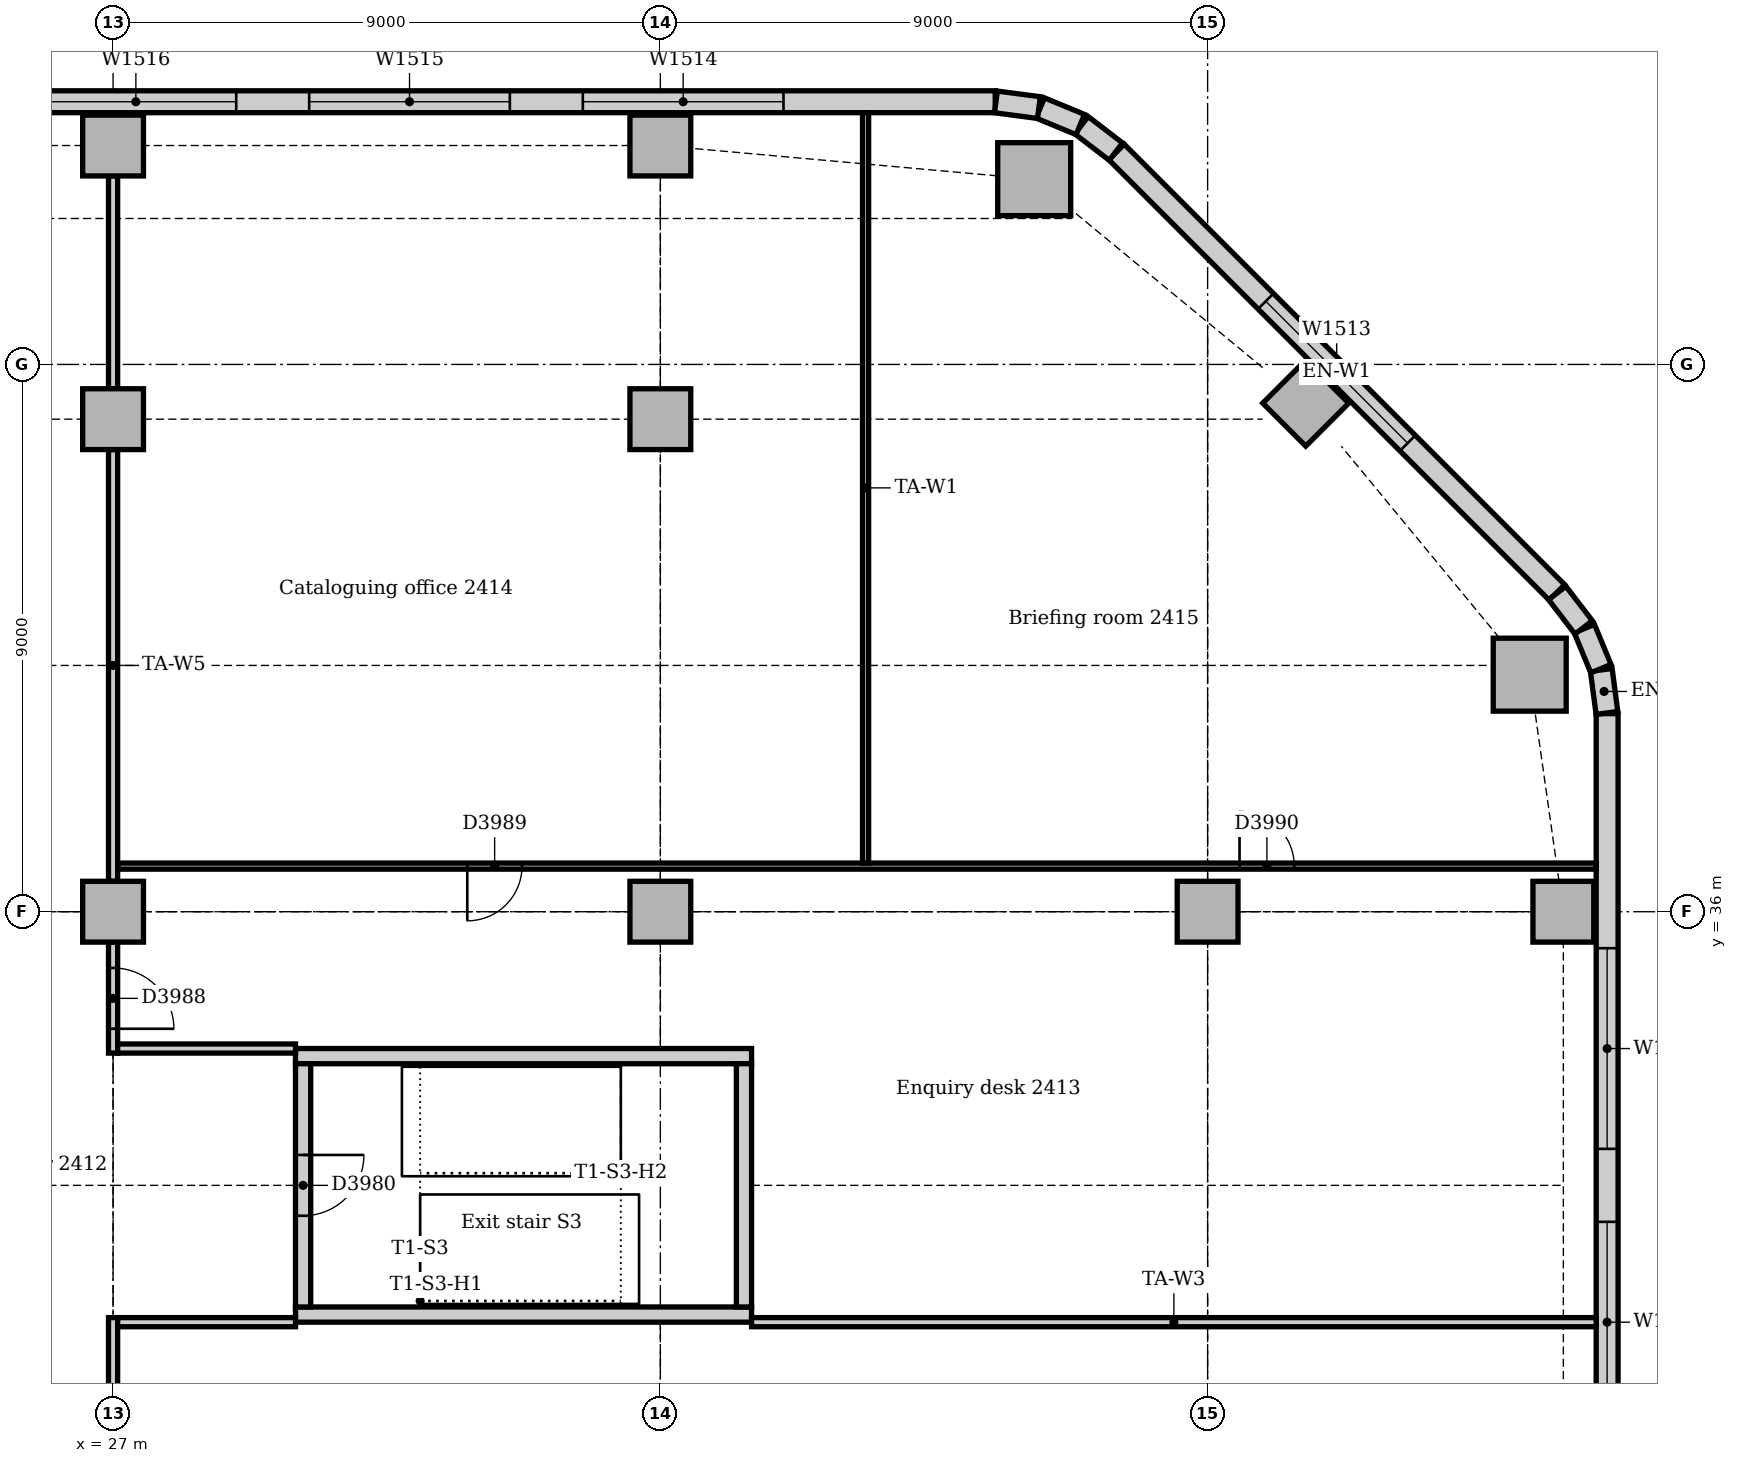
"""IFC4 building model, lengths in metres.
Left out: names, types, materials, properties, quantities, classifications, styles, units other than length and angle.
Written with IfcOpenShell. Run it as: python <this file> out.ifc"""

import sys

from ifc_helpers import new_model, si_unit, direction, frame, frame_2d, origin, origin_2d, place, context, subcontext, project, spatial, rectangle, extrude, element, fill, save


model = new_model("IFC4")
c1 = context("Model", 3, precision=1e-05, world=origin(), true_north=direction((0.0, 1.0)))
c2 = subcontext(c1, "Body", "Model", "MODEL_VIEW")
j1 = project(units=[si_unit("LENGTHUNIT", "METRE"), si_unit("PLANEANGLEUNIT", "RADIAN")], contexts=[c1])
p1 = place(None, origin())
s1 = spatial("IfcSite", under=j1, at=p1, CompositionType="ELEMENT")
p2 = place(p1, origin())
s2 = spatial("IfcBuilding", under=s1, at=p2, CompositionType="ELEMENT")
p3 = place(p2, frame((0.0, 0.0, 104.0)))
s3 = spatial("IfcBuildingStorey", under=s2, at=p3, CompositionType="ELEMENT", Elevation=104.0)
for number, where, z_axis, x_axis in (
    (1, (30.0, 29.375, 0.0), (0.0, 0.0, 1.0), (1.0, 0.0, 0.0)),
    (2, (37.5, 33.625, 0.0), (0.0, 0.0, 1.0), (-1.0, 0.0, 0.0)),
):
    element("IfcWall", number, at=place(p3, frame(where, z_axis=z_axis, x_axis=x_axis)), inside=s3, PredefinedType="SOLIDWALL", context=c2, shape_type="SweptSolid", body=[
        extrude(rectangle(XDim=7.5, YDim=0.25, at=frame_2d((3.75, 0.0))), origin(), (0.0, 0.0, 1.0), 4.0),
    ])
p4 = place(p3, frame((37.375, 29.5, 0.0), z_axis=(0.0, 0.0, 1.0), x_axis=(0.0, 1.0, 0.0)))
e3 = element("IfcWall", 3, at=p4, inside=s3, PredefinedType="SOLIDWALL", context=c2, shape_type="SweptSolid", body=[
    extrude(rectangle(XDim=4.0, YDim=0.25, at=frame_2d((2.0, 0.0))), origin(), (0.0, 0.0, 1.0), 4.0),
])
p5 = place(p3, frame((30.125, 33.5, 0.0), z_axis=(0.0, 0.0, 1.0), x_axis=(0.0, -1.0, 0.0)))
e4 = element("IfcWall", 4, at=p5, inside=s3, PredefinedType="SOLIDWALL", context=c2, shape_type="SweptSolid", body=[
    extrude(rectangle(XDim=4.0, YDim=0.25, at=frame_2d((2.0, 0.0))), origin(), (0.0, 0.0, 1.0), 4.0),
])
p6 = place(p5, frame((1.5, 0.0, 0.0)))
e5 = element("IfcOpeningElement", 5, at=p6, cuts=e4, PredefinedType="OPENING", context=c2, shape_type="SweptSolid", body=[
    extrude(rectangle(XDim=1.0, YDim=2.1, at=frame_2d((0.5, 1.05))), frame((0.0, 0.135, 0.0), z_axis=(0.0, -1.0, 0.0), x_axis=(1.0, 0.0, 0.0)), (0.0, 0.0, 1.0), 0.27),
])
for number, where, z_axis, x_axis in (
    (6, (50.297, 39.898, 0.0), (0.0, 0.0, 1.0), (1.0, 0.0, 0.0)),
    (7, (42.148, 48.047, 0.0), (0.0, 0.0, 1.0), (1.0, 0.0, 0.0)),
):
    element("IfcColumn", number, at=place(p3, frame(where, z_axis=z_axis, x_axis=x_axis)), inside=s3, PredefinedType="COLUMN", context=c2, shape_type="SweptSolid", body=[
        extrude(rectangle(XDim=1.2, YDim=1.2, at=origin_2d()), origin(), (0.0, 0.0, 1.0), 3.85),
    ])
for number, where, z_axis, x_axis in (
    (8, (50.85, 36.0, 0.0), (0.0, 0.0, 1.0), (1.0, 0.0, 0.0)),
    (9, (46.614, 44.364, 0.0), (0.0, 0.0, 1.0), (0.707, 0.707, 0.0)),
    (10, (27.0, 48.6, 0.0), (0.0, 0.0, 1.0), (1.0, 0.0, 0.0)),
    (11, (36.0, 48.6, 0.0), (0.0, 0.0, 1.0), (1.0, 0.0, 0.0)),
    (12, (27.0, 36.0, 0.0), (0.0, 0.0, 1.0), (1.0, 0.0, 0.0)),
    (13, (27.0, 44.1, 0.0), (0.0, 0.0, 1.0), (1.0, 0.0, 0.0)),
    (14, (36.0, 36.0, 0.0), (0.0, 0.0, 1.0), (1.0, 0.0, 0.0)),
    (15, (36.0, 44.1, 0.0), (0.0, 0.0, 1.0), (1.0, 0.0, 0.0)),
    (16, (45.0, 36.0, 0.0), (0.0, 0.0, 1.0), (1.0, 0.0, 0.0)),
):
    element("IfcColumn", number, at=place(p3, frame(where, z_axis=z_axis, x_axis=x_axis)), inside=s3, PredefinedType="COLUMN", context=c2, shape_type="SweptSolid", body=[
        extrude(rectangle(XDim=1.0, YDim=1.0, at=origin_2d()), origin(), (0.0, 0.0, 1.0), 3.85),
    ])
p7 = place(p3, frame((51.57, 14.743, 0.0), z_axis=(0.0, 0.0, 1.0), x_axis=(0.0, 1.0, 0.0)))
e17 = element("IfcWall", 17, at=p7, inside=s3, PredefinedType="STANDARD", context=c2, shape_type="SweptSolid", body=[
    extrude(rectangle(XDim=24.515, YDim=0.36, at=frame_2d((12.257, 0.0))), origin(), (0.0, 0.0, 1.0), 3.85),
])
p8 = place(p7, frame((4.257, 0.0, 0.9)))
e18 = element("IfcOpeningElement", 18, at=p8, cuts=e17, PredefinedType="OPENING", context=c2, shape_type="SweptSolid", body=[
    extrude(rectangle(XDim=1.8, YDim=1.6, at=frame_2d((0.9, 0.8))), frame((0.0, 0.19, 0.0), z_axis=(0.0, -1.0, 0.0), x_axis=(1.0, 0.0, 0.0)), (0.0, 0.0, 1.0), 0.38),
])
p9 = place(p7, frame((8.357, 0.0, 0.9)))
e19 = element("IfcOpeningElement", 19, at=p9, cuts=e17, PredefinedType="OPENING", context=c2, shape_type="SweptSolid", body=[
    extrude(rectangle(XDim=3.3, YDim=1.6, at=frame_2d((1.65, 0.8))), frame((0.0, 0.19, 0.0), z_axis=(0.0, -1.0, 0.0), x_axis=(1.0, 0.0, 0.0)), (0.0, 0.0, 1.0), 0.38),
])
p10 = place(p7, frame((12.857, 0.0, 0.9)))
e20 = element("IfcOpeningElement", 20, at=p10, cuts=e17, PredefinedType="OPENING", context=c2, shape_type="SweptSolid", body=[
    extrude(rectangle(XDim=3.3, YDim=1.6, at=frame_2d((1.65, 0.8))), frame((0.0, 0.19, 0.0), z_axis=(0.0, -1.0, 0.0), x_axis=(1.0, 0.0, 0.0)), (0.0, 0.0, 1.0), 0.38),
])
p11 = place(p7, frame((17.357, 0.0, 0.9)))
e21 = element("IfcOpeningElement", 21, at=p11, cuts=e17, PredefinedType="OPENING", context=c2, shape_type="SweptSolid", body=[
    extrude(rectangle(XDim=3.3, YDim=1.6, at=frame_2d((1.65, 0.8))), frame((0.0, 0.19, 0.0), z_axis=(0.0, -1.0, 0.0), x_axis=(1.0, 0.0, 0.0)), (0.0, 0.0, 1.0), 0.38),
])
p12 = place(p3, frame((50.744, 41.251, 0.0), z_axis=(0.0, 0.0, 1.0), x_axis=(-0.707106781187, 0.707106781187, 0.0)))
e22 = element("IfcWall", 22, at=p12, inside=s3, PredefinedType="STANDARD", context=c2, shape_type="SweptSolid", body=[
    extrude(rectangle(XDim=10.243, YDim=0.36, at=frame_2d((5.121, 0.0))), origin(), (0.0, 0.0, 1.0), 3.85),
])
p13 = place(p12, frame((3.471, 0.0, 0.9)))
e23 = element("IfcOpeningElement", 23, at=p13, cuts=e22, PredefinedType="OPENING", context=c2, shape_type="SweptSolid", body=[
    extrude(rectangle(XDim=3.3, YDim=1.6, at=frame_2d((1.65, 0.8))), frame((0.0, 0.19, 0.0), z_axis=(0.0, -1.0, 0.0), x_axis=(1.0, 0.0, 0.0)), (0.0, 0.0, 1.0), 0.38),
])
p14 = place(p3, frame((41.507, 49.32, 0.0), z_axis=(0.0, 0.0, 1.0), x_axis=(-1.0, 0.0, 0.0)))
e24 = element("IfcWall", 24, at=p14, inside=s3, PredefinedType="STANDARD", context=c2, shape_type="SweptSolid", body=[
    extrude(rectangle(XDim=37.265, YDim=0.36, at=frame_2d((18.632, 0.0))), origin(), (0.0, 0.0, 1.0), 3.85),
])
p15 = place(p14, frame((3.482, 0.0, 0.9)))
e25 = element("IfcOpeningElement", 25, at=p15, cuts=e24, PredefinedType="OPENING", context=c2, shape_type="SweptSolid", body=[
    extrude(rectangle(XDim=3.3, YDim=1.6, at=frame_2d((1.65, 0.8))), frame((0.0, 0.19, 0.0), z_axis=(0.0, -1.0, 0.0), x_axis=(1.0, 0.0, 0.0)), (0.0, 0.0, 1.0), 0.38),
])
p16 = place(p14, frame((7.982, 0.0, 0.9)))
e26 = element("IfcOpeningElement", 26, at=p16, cuts=e24, PredefinedType="OPENING", context=c2, shape_type="SweptSolid", body=[
    extrude(rectangle(XDim=3.3, YDim=1.6, at=frame_2d((1.65, 0.8))), frame((0.0, 0.19, 0.0), z_axis=(0.0, -1.0, 0.0), x_axis=(1.0, 0.0, 0.0)), (0.0, 0.0, 1.0), 0.38),
])
p17 = place(p14, frame((12.482, 0.0, 0.9)))
e27 = element("IfcOpeningElement", 27, at=p17, cuts=e24, PredefinedType="OPENING", context=c2, shape_type="SweptSolid", body=[
    extrude(rectangle(XDim=3.3, YDim=1.6, at=frame_2d((1.65, 0.8))), frame((0.0, 0.19, 0.0), z_axis=(0.0, -1.0, 0.0), x_axis=(1.0, 0.0, 0.0)), (0.0, 0.0, 1.0), 0.38),
])
p18 = place(p14, frame((17.032, 0.0, 0.9)))
e28 = element("IfcOpeningElement", 28, at=p18, cuts=e24, PredefinedType="OPENING", context=c2, shape_type="SweptSolid", body=[
    extrude(rectangle(XDim=1.8, YDim=1.6, at=frame_2d((0.9, 0.8))), frame((0.0, 0.19, 0.0), z_axis=(0.0, -1.0, 0.0), x_axis=(1.0, 0.0, 0.0)), (0.0, 0.0, 1.0), 0.38),
])
p19 = place(p14, frame((21.482, 0.0, 0.9)))
e29 = element("IfcOpeningElement", 29, at=p19, cuts=e24, PredefinedType="OPENING", context=c2, shape_type="SweptSolid", body=[
    extrude(rectangle(XDim=3.3, YDim=1.6, at=frame_2d((1.65, 0.8))), frame((0.0, 0.19, 0.0), z_axis=(0.0, -1.0, 0.0), x_axis=(1.0, 0.0, 0.0)), (0.0, 0.0, 1.0), 0.38),
])
p20 = place(p14, frame((25.982, 0.0, 0.9)))
e30 = element("IfcOpeningElement", 30, at=p20, cuts=e24, PredefinedType="OPENING", context=c2, shape_type="SweptSolid", body=[
    extrude(rectangle(XDim=3.3, YDim=1.6, at=frame_2d((1.65, 0.8))), frame((0.0, 0.19, 0.0), z_axis=(0.0, -1.0, 0.0), x_axis=(1.0, 0.0, 0.0)), (0.0, 0.0, 1.0), 0.38),
])
p21 = place(p14, frame((30.482, 0.0, 0.9)))
e31 = element("IfcOpeningElement", 31, at=p21, cuts=e24, PredefinedType="OPENING", context=c2, shape_type="SweptSolid", body=[
    extrude(rectangle(XDim=3.3, YDim=1.6, at=frame_2d((1.65, 0.8))), frame((0.0, 0.19, 0.0), z_axis=(0.0, -1.0, 0.0), x_axis=(1.0, 0.0, 0.0)), (0.0, 0.0, 1.0), 0.38),
])
for number, where, z_axis, x_axis in (
    (32, (51.567, 39.269, 0.0), (0.0, 0.0, 1.0), (-0.131, 0.991, 0.0)),
    (33, (51.468, 39.997, 0.0), (0.0, 0.0, 1.0), (-0.383, 0.924, 0.0)),
):
    element("IfcWall", number, at=place(p3, frame(where, z_axis=z_axis, x_axis=x_axis)), inside=s3, PredefinedType="STANDARD", context=c2, shape_type="SweptSolid", body=[
        extrude(rectangle(XDim=0.713, YDim=0.36, at=frame_2d((0.356, 0.0))), origin(), (0.0, 0.0, 1.0), 3.85),
    ])
for number, where, z_axis, x_axis in (
    (34, (51.184, 40.675, 0.0), (0.0, 0.0, 1.0), (-0.609, 0.793, 0.0)),
    (35, (43.491, 48.5, 0.0), (0.0, 0.0, 1.0), (-0.793, 0.609, 0.0)),
):
    element("IfcWall", number, at=place(p3, frame(where, z_axis=z_axis, x_axis=x_axis)), inside=s3, PredefinedType="STANDARD", context=c2, shape_type="SweptSolid", body=[
        extrude(rectangle(XDim=0.713, YDim=0.36, at=frame_2d((0.357, 0.0))), origin(), (0.0, 0.0, 1.0), 3.85),
    ])
for number, where, z_axis, x_axis in (
    (36, (42.906, 48.945, 0.0), (0.0, 0.0, 1.0), (-0.924, 0.383, 0.0)),
    (37, (42.226, 49.224, 0.0), (0.0, 0.0, 1.0), (-0.991, 0.131, 0.0)),
):
    element("IfcWall", number, at=place(p3, frame(where, z_axis=z_axis, x_axis=x_axis)), inside=s3, PredefinedType="STANDARD", context=c2, shape_type="SweptSolid", body=[
        extrude(rectangle(XDim=0.713, YDim=0.36, at=frame_2d((0.356, 0.0))), origin(), (0.0, 0.0, 1.0), 3.85),
    ])
p22 = place(p3, frame((27.0, 33.675, 0.0), z_axis=(0.0, 0.0, 1.0), x_axis=(0.0, 1.0, 0.0)))
e38 = element("IfcWall", 38, at=p22, inside=s3, PredefinedType="PARTITIONING", context=c2, shape_type="SweptSolid", body=[
    extrude(rectangle(XDim=1.825, YDim=0.15, at=frame_2d((0.912, 0.0))), origin(), (0.0, 0.0, 1.0), 3.256),
])
p23 = place(p22, frame((0.4, 0.0, 0.0)))
e39 = element("IfcOpeningElement", 39, at=p23, cuts=e38, PredefinedType="OPENING", context=c2, shape_type="SweptSolid", body=[
    extrude(rectangle(XDim=1.0, YDim=2.1, at=frame_2d((0.5, 1.05))), frame((0.0, 0.085, 0.0), z_axis=(0.0, -1.0, 0.0), x_axis=(1.0, 0.0, 0.0)), (0.0, 0.0, 1.0), 0.17),
])
p24 = place(p3, frame((27.0, 36.5, 0.0), z_axis=(0.0, 0.0, 1.0), x_axis=(0.0, 1.0, 0.0)))
e40 = element("IfcWall", 40, at=p24, inside=s3, PredefinedType="PARTITIONING", context=c2, shape_type="SweptSolid", body=[
    extrude(rectangle(XDim=7.1, YDim=0.15, at=frame_2d((3.55, 0.0))), origin(), (0.0, 0.0, 1.0), 3.256),
])
p25 = place(p3, frame((27.0, 44.6, 0.0), z_axis=(0.0, 0.0, 1.0), x_axis=(0.0, 1.0, 0.0)))
e41 = element("IfcWall", 41, at=p25, inside=s3, PredefinedType="PARTITIONING", context=c2, shape_type="SweptSolid", body=[
    extrude(rectangle(XDim=3.5, YDim=0.15, at=frame_2d((1.75, 0.0))), origin(), (0.0, 0.0, 1.0), 3.652),
])
p26 = place(p3, frame((27.0, 27.5, 0.0), z_axis=(0.0, 0.0, 1.0), x_axis=(0.0, 1.0, 0.0)))
e42 = element("IfcWall", 42, at=p26, inside=s3, PredefinedType="PARTITIONING", context=c2, shape_type="SweptSolid", body=[
    extrude(rectangle(XDim=1.825, YDim=0.15, at=frame_2d((0.912, 0.0))), origin(), (0.0, 0.0, 1.0), 3.256),
])
for number, where, z_axis, x_axis in (
    (43, (27.075, 29.25, 0.0), (0.0, 0.0, 1.0), (1.0, 0.0, 0.0)),
    (44, (27.075, 33.75, 0.0), (0.0, 0.0, 1.0), (1.0, 0.0, 0.0)),
):
    element("IfcWall", number, at=place(p3, frame(where, z_axis=z_axis, x_axis=x_axis)), inside=s3, PredefinedType="PARTITIONING", context=c2, shape_type="SweptSolid", body=[
        extrude(rectangle(XDim=2.925, YDim=0.15, at=frame_2d((1.462, 0.0))), origin(), (0.0, 0.0, 1.0), 3.85),
    ])
p27 = place(p3, frame((37.5, 29.25, 0.0), z_axis=(0.0, 0.0, 1.0), x_axis=(1.0, 0.0, 0.0)))
e45 = element("IfcWall", 45, at=p27, inside=s3, PredefinedType="PARTITIONING", context=c2, shape_type="SweptSolid", body=[
    extrude(rectangle(XDim=13.89, YDim=0.15, at=frame_2d((6.945, 0.0))), origin(), (0.0, 0.0, 1.0), 3.85),
])
p28 = place(p3, frame((27.075, 36.75, 0.0), z_axis=(0.0, 0.0, 1.0), x_axis=(1.0, 0.0, 0.0)))
e46 = element("IfcWall", 46, at=p28, inside=s3, PredefinedType="PARTITIONING", context=c2, shape_type="SweptSolid", body=[
    extrude(rectangle(XDim=24.315, YDim=0.1, at=frame_2d((12.158, 0.0))), origin(), (0.0, 0.0, 1.0), 3.85),
])
p29 = place(p28, frame((5.75, 0.0, 0.0)))
e47 = element("IfcOpeningElement", 47, at=p29, cuts=e46, PredefinedType="OPENING", context=c2, shape_type="SweptSolid", body=[
    extrude(rectangle(XDim=0.9, YDim=2.1, at=frame_2d((0.45, 1.05))), frame((0.0, 0.06, 0.0), z_axis=(0.0, -1.0, 0.0), x_axis=(1.0, 0.0, 0.0)), (0.0, 0.0, 1.0), 0.12),
])
p30 = place(p28, frame((18.45, 0.0, 0.0)))
e48 = element("IfcOpeningElement", 48, at=p30, cuts=e46, PredefinedType="OPENING", context=c2, shape_type="SweptSolid", body=[
    extrude(rectangle(XDim=0.9, YDim=2.1, at=frame_2d((0.45, 1.05))), frame((0.0, 0.06, 0.0), z_axis=(0.0, -1.0, 0.0), x_axis=(1.0, 0.0, 0.0)), (0.0, 0.0, 1.0), 0.12),
])
p31 = place(p3, frame((39.375, 36.8, 0.0), z_axis=(0.0, 0.0, 1.0), x_axis=(0.0, 1.0, 0.0)))
e49 = element("IfcWall", 49, at=p31, inside=s3, PredefinedType="PARTITIONING", context=c2, shape_type="SweptSolid", body=[
    extrude(rectangle(XDim=12.34, YDim=0.1, at=frame_2d((6.17, 0.0))), origin(), (0.0, 0.0, 1.0), 3.85),
])
p32 = place(p10, origin())
e50 = element("IfcWindow", 50, at=p32, inside=s3, PartitioningType="SINGLE_PANEL", PredefinedType="WINDOW", context=c2, shape_type="SweptSolid", body=[
    extrude(rectangle(XDim=3.3, YDim=1.6, at=frame_2d((1.65, 0.8))), frame((0.0, 0.13, 0.0), z_axis=(0.0, -1.0, 0.0), x_axis=(1.0, 0.0, 0.0)), (0.0, 0.0, 1.0), 0.06),
])
fill(e20, e50)
p33 = place(p11, origin())
e51 = element("IfcWindow", 51, at=p33, inside=s3, PartitioningType="SINGLE_PANEL", PredefinedType="WINDOW", context=c2, shape_type="SweptSolid", body=[
    extrude(rectangle(XDim=3.3, YDim=1.6, at=frame_2d((1.65, 0.8))), frame((0.0, 0.13, 0.0), z_axis=(0.0, -1.0, 0.0), x_axis=(1.0, 0.0, 0.0)), (0.0, 0.0, 1.0), 0.06),
])
fill(e21, e51)
p34 = place(p13, origin())
e52 = element("IfcWindow", 52, at=p34, inside=s3, PartitioningType="SINGLE_PANEL", PredefinedType="WINDOW", context=c2, shape_type="SweptSolid", body=[
    extrude(rectangle(XDim=3.3, YDim=1.6, at=frame_2d((1.65, 0.8))), frame((0.0, 0.13, 0.0), z_axis=(0.0, -1.0, 0.0), x_axis=(1.0, 0.0, 0.0)), (0.0, 0.0, 1.0), 0.06),
])
fill(e23, e52)
p35 = place(p15, origin())
e53 = element("IfcWindow", 53, at=p35, inside=s3, PartitioningType="SINGLE_PANEL", PredefinedType="WINDOW", context=c2, shape_type="SweptSolid", body=[
    extrude(rectangle(XDim=3.3, YDim=1.6, at=frame_2d((1.65, 0.8))), frame((0.0, 0.13, 0.0), z_axis=(0.0, -1.0, 0.0), x_axis=(1.0, 0.0, 0.0)), (0.0, 0.0, 1.0), 0.06),
])
fill(e25, e53)
p36 = place(p16, origin())
e54 = element("IfcWindow", 54, at=p36, inside=s3, PartitioningType="SINGLE_PANEL", PredefinedType="WINDOW", context=c2, shape_type="SweptSolid", body=[
    extrude(rectangle(XDim=3.3, YDim=1.6, at=frame_2d((1.65, 0.8))), frame((0.0, 0.13, 0.0), z_axis=(0.0, -1.0, 0.0), x_axis=(1.0, 0.0, 0.0)), (0.0, 0.0, 1.0), 0.06),
])
fill(e26, e54)
p37 = place(p17, origin())
e55 = element("IfcWindow", 55, at=p37, inside=s3, PartitioningType="SINGLE_PANEL", PredefinedType="WINDOW", context=c2, shape_type="SweptSolid", body=[
    extrude(rectangle(XDim=3.3, YDim=1.6, at=frame_2d((1.65, 0.8))), frame((0.0, 0.13, 0.0), z_axis=(0.0, -1.0, 0.0), x_axis=(1.0, 0.0, 0.0)), (0.0, 0.0, 1.0), 0.06),
])
fill(e27, e55)
p38 = place(p6, origin())
e56 = element("IfcDoor", 56, at=p38, inside=s3, OperationType="SINGLE_SWING_LEFT", PredefinedType="DOOR", context=c2, shape_type="SweptSolid", body=[
    extrude(rectangle(XDim=1.0, YDim=2.1, at=frame_2d((0.5, 1.05))), frame((0.0, 0.025, 0.0), z_axis=(0.0, -1.0, 0.0), x_axis=(1.0, 0.0, 0.0)), (0.0, 0.0, 1.0), 0.05),
])
fill(e5, e56)
p39 = place(p23, frame((1.0, 0.0, 0.0), z_axis=(0.0, 0.0, 1.0), x_axis=(-1.0, 0.0, 0.0)))
e57 = element("IfcDoor", 57, at=p39, inside=s3, OperationType="SINGLE_SWING_RIGHT", PredefinedType="DOOR", context=c2, shape_type="SweptSolid", body=[
    extrude(rectangle(XDim=1.0, YDim=2.1, at=frame_2d((0.5, 1.05))), frame((0.0, 0.025, 0.0), z_axis=(0.0, -1.0, 0.0), x_axis=(1.0, 0.0, 0.0)), (0.0, 0.0, 1.0), 0.05),
])
fill(e39, e57)
p40 = place(p29, frame((0.9, 0.0, 0.0), z_axis=(0.0, 0.0, 1.0), x_axis=(-1.0, 0.0, 0.0)))
e58 = element("IfcDoor", 58, at=p40, inside=s3, OperationType="SINGLE_SWING_RIGHT", PredefinedType="DOOR", context=c2, shape_type="SweptSolid", body=[
    extrude(rectangle(XDim=0.9, YDim=2.1, at=frame_2d((0.45, 1.05))), frame((0.0, 0.025, 0.0), z_axis=(0.0, -1.0, 0.0), x_axis=(1.0, 0.0, 0.0)), (0.0, 0.0, 1.0), 0.05),
])
fill(e47, e58)
p41 = place(p30, origin())
e59 = element("IfcDoor", 59, at=p41, inside=s3, OperationType="SINGLE_SWING_LEFT", PredefinedType="DOOR", context=c2, shape_type="SweptSolid", body=[
    extrude(rectangle(XDim=0.9, YDim=2.1, at=frame_2d((0.45, 1.05))), frame((0.0, 0.025, 0.0), z_axis=(0.0, -1.0, 0.0), x_axis=(1.0, 0.0, 0.0)), (0.0, 0.0, 1.0), 0.05),
])
fill(e48, e59)
save(model, sys.argv[1])
